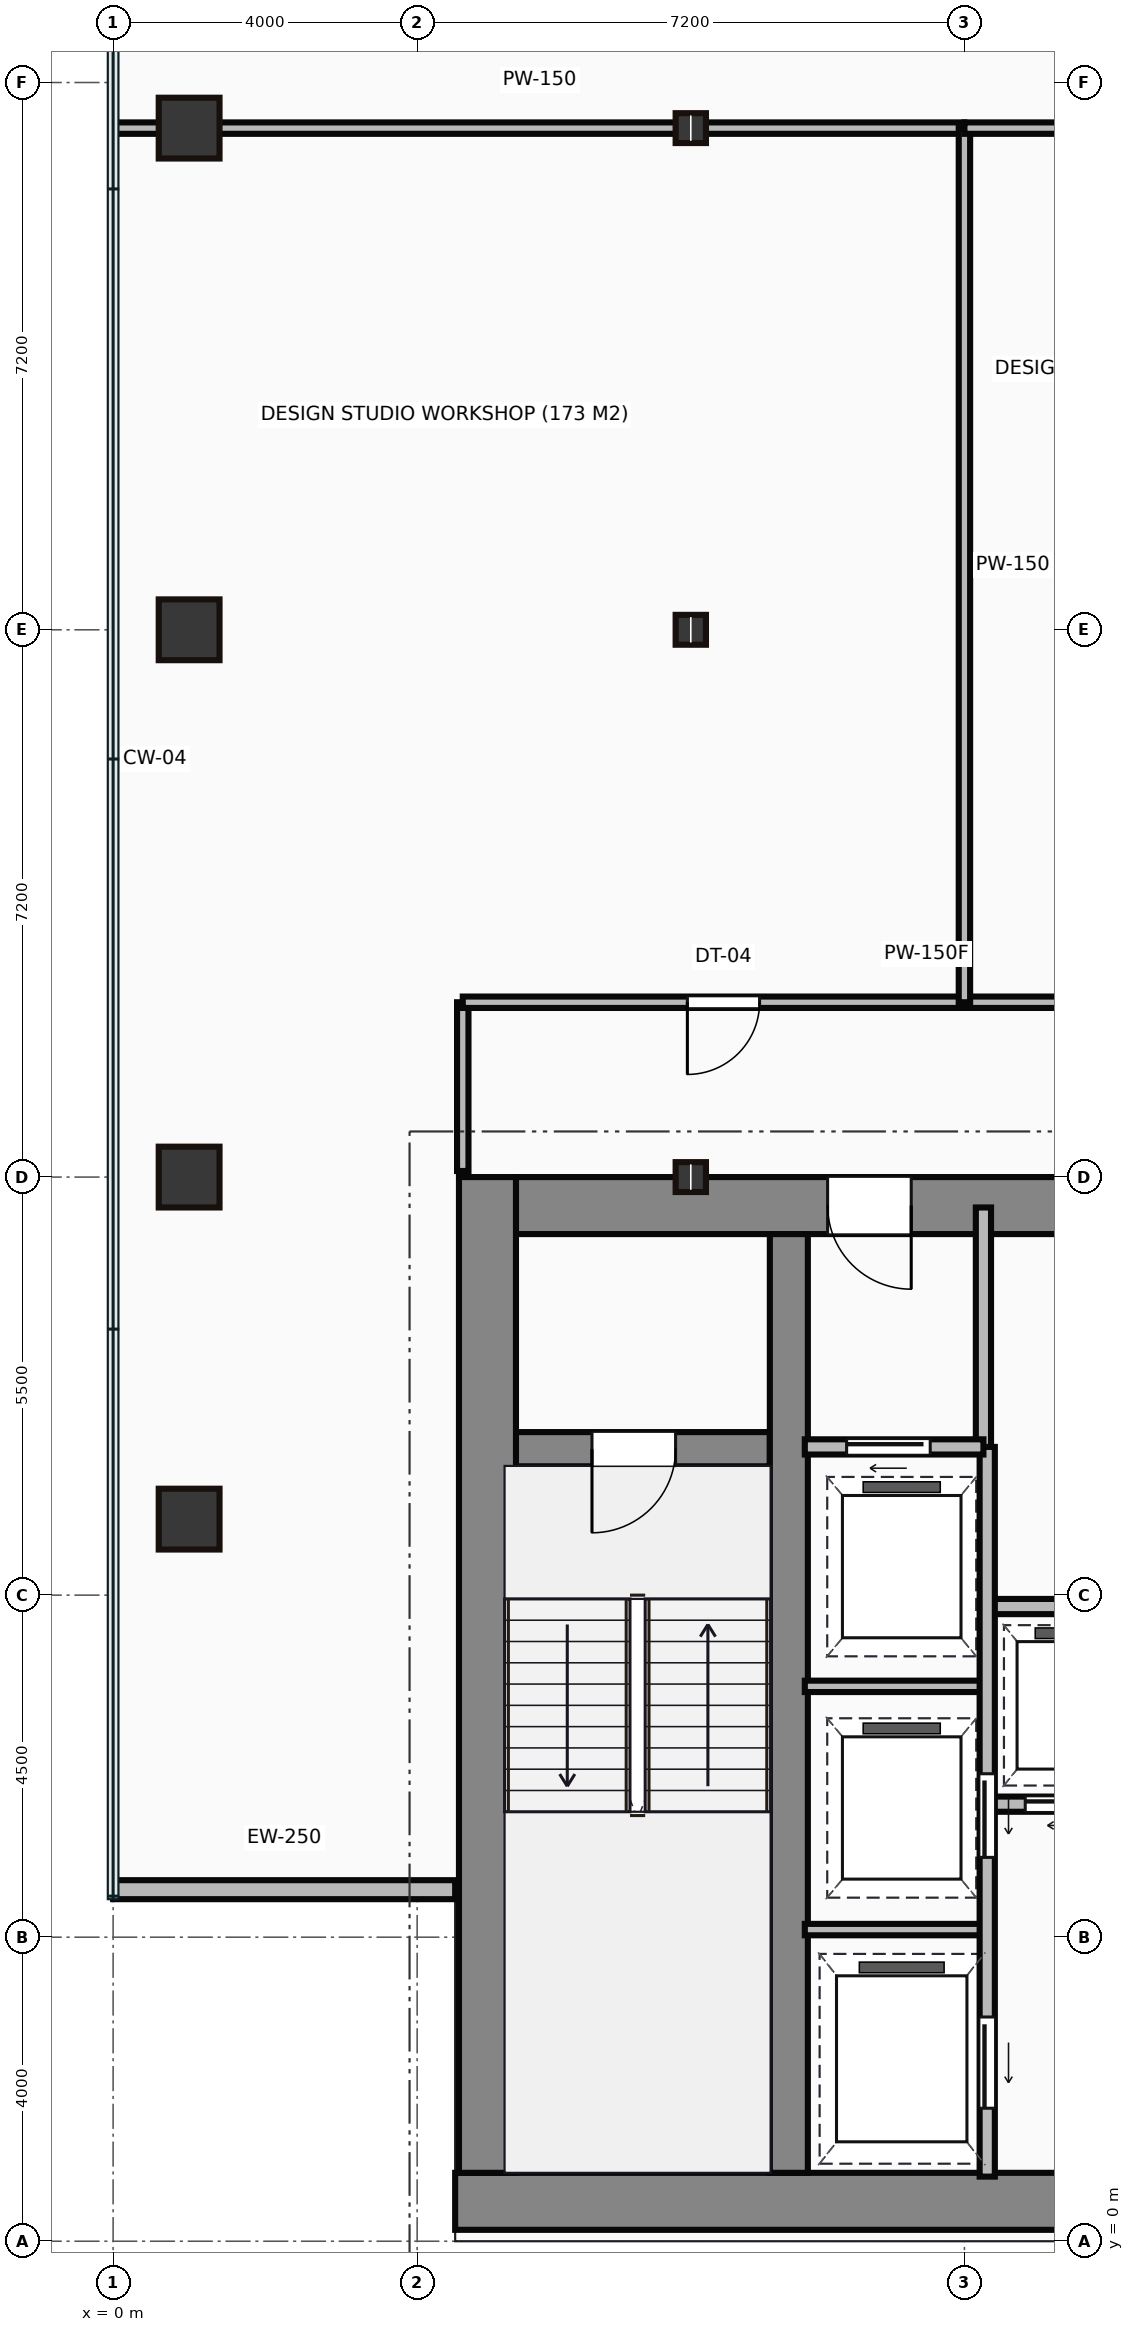
"""IFC4 building model, lengths in metres.
Left out: names, types, materials, properties, quantities, classifications, styles, units other than length and angle.
Written with IfcOpenShell. Run it as: python <this file> out.ifc"""

import sys

from ifc_helpers import new_model, si_unit, direction, frame, frame_2d, origin, origin_2d, place, context, subcontext, project, spatial, rectangle, hollow_rectangle, i_section, extrude, source, transform, mapped, element, fill, save


model = new_model("IFC4")
c1 = context("Model", 3, precision=1e-05, world=origin(), true_north=direction((0.0, 1.0)))
c2 = subcontext(c1, "Body", "Model", "MODEL_VIEW")
j1 = project(units=[si_unit("LENGTHUNIT", "METRE"), si_unit("PLANEANGLEUNIT", "RADIAN")], contexts=[c1])
p1 = place(None, origin())
s1 = spatial("IfcSite", under=j1, at=p1, CompositionType="ELEMENT")
p2 = place(p1, origin())
s2 = spatial("IfcBuilding", under=s1, at=p2, CompositionType="ELEMENT")
p3 = place(p2, frame((0.0, 0.0, 92.3)))
s3 = spatial("IfcBuildingStorey", under=s2, at=p3, CompositionType="ELEMENT", Elevation=92.3)
m1 = source(origin(), c2, "Body", "SweptSolid", [
    extrude(rectangle(XDim=29.5, YDim=0.75, at=frame_2d((14.75, 0.0))), origin(), (0.0, 0.0, 1.0), 3.65),
])
p4 = place(p3, frame((4.5, 0.525, 0.0), z_axis=(0.0, 0.0, 1.0), x_axis=(1.0, 0.0, 0.0)))
e1 = element("IfcWall", 1, at=p4, inside=s3, PredefinedType="SHEAR", context=c2, shape_type="MappedRepresentation", body=[
    mapped(m1, transform((0.0, 0.0, 0.0))),
])
m2 = source(origin(), c2, "Body", "SweptSolid", [
    extrude(rectangle(XDim=13.1, YDim=0.75, at=frame_2d((6.55, 0.0))), origin(), (0.0, 0.0, 1.0), 3.65),
])
p5 = place(p3, frame((4.925, 0.9, 0.0), z_axis=(0.0, 0.0, 1.0), x_axis=(0.0, 1.0, 0.0)))
e2 = element("IfcWall", 2, at=p5, inside=s3, PredefinedType="SHEAR", context=c2, shape_type="MappedRepresentation", body=[
    mapped(m2, transform((0.0, 0.0, 0.0))),
])
m3 = source(origin(), c2, "Body", "SweptSolid", [
    extrude(rectangle(XDim=9.1, YDim=0.75, at=frame_2d((4.55, 0.0))), origin(), (0.0, 0.0, 1.0), 3.65),
])
p6 = place(p3, frame((5.3, 13.625, 0.0), z_axis=(0.0, 0.0, 1.0), x_axis=(1.0, 0.0, 0.0)))
e3 = element("IfcWall", 3, at=p6, inside=s3, PredefinedType="SHEAR", context=c2, shape_type="MappedRepresentation", body=[
    mapped(m3, transform((0.0, 0.0, 0.0))),
])
p7 = place(p6, frame((4.1, 0.0, 0.0)))
e4 = element("IfcOpeningElement", 4, at=p7, cuts=e3, PredefinedType="OPENING", context=c2, shape_type="SweptSolid", body=[
    extrude(rectangle(XDim=1.1, YDim=2.15, at=frame_2d((0.55, 1.075))), frame((0.0, 0.385, 0.0), z_axis=(0.0, -1.0, 0.0), x_axis=(1.0, 0.0, 0.0)), (0.0, 0.0, 1.0), 0.77),
])
m4 = source(origin(), c2, "Body", "SweptSolid", [
    extrude(rectangle(XDim=12.35, YDim=0.5, at=frame_2d((6.175, 0.0))), origin(), (0.0, 0.0, 1.0), 3.65),
])
p8 = place(p3, frame((8.89, 0.9, 0.0), z_axis=(0.0, 0.0, 1.0), x_axis=(0.0, 1.0, 0.0)))
e5 = element("IfcWall", 5, at=p8, inside=s3, PredefinedType="SHEAR", context=c2, shape_type="MappedRepresentation", body=[
    mapped(m4, transform((0.0, 0.0, 0.0))),
])
m5 = source(origin(), c2, "Body", "SweptSolid", [
    extrude(rectangle(XDim=3.39, YDim=0.45, at=frame_2d((1.695, 0.0))), origin(), (0.0, 0.0, 1.0), 3.65),
])
p9 = place(p3, frame((5.25, 10.42, 0.0), z_axis=(0.0, 0.0, 1.0), x_axis=(1.0, 0.0, 0.0)))
e6 = element("IfcWall", 6, at=p9, inside=s3, PredefinedType="SHEAR", context=c2, shape_type="MappedRepresentation", body=[
    mapped(m5, transform((0.0, 0.0, 0.0))),
])
p10 = place(p9, frame((1.05, 0.0, 0.0)))
e7 = element("IfcOpeningElement", 7, at=p10, cuts=e6, PredefinedType="OPENING", context=c2, shape_type="SweptSolid", body=[
    extrude(rectangle(XDim=1.1, YDim=2.15, at=frame_2d((0.55, 1.075))), frame((0.0, 0.235, 0.0), z_axis=(0.0, -1.0, 0.0), x_axis=(1.0, 0.0, 0.0)), (0.0, 0.0, 1.0), 0.47),
])
m6 = source(origin(), c2, "Body", "SweptSolid", [
    extrude(hollow_rectangle(XDim=0.8, YDim=0.8, WallThickness=0.04, at=origin_2d()), origin(), (0.0, 0.0, 1.0), 3.65),
])
for number, where, z_axis, x_axis in (
    (8, (1.0, 9.5, 0.0), (0.0, 0.0, 1.0), (1.0, 0.0, 0.0)),
    (9, (1.0, 14.0, 0.0), (0.0, 0.0, 1.0), (1.0, 0.0, 0.0)),
    (10, (1.0, 21.2, 0.0), (0.0, 0.0, 1.0), (1.0, 0.0, 0.0)),
    (11, (1.0, 27.8, 0.0), (0.0, 0.0, 1.0), (1.0, 0.0, 0.0)),
):
    element("IfcColumn", number, at=place(p3, frame(where, z_axis=z_axis, x_axis=x_axis)), inside=s3, PredefinedType="COLUMN", context=c2, shape_type="MappedRepresentation", body=[
        mapped(m6, transform((0.0, 0.0, 0.0))),
    ])
m7 = source(origin(), c2, "Body", "SweptSolid", [
    extrude(i_section(OverallWidth=0.399, OverallDepth=0.393, WebThickness=0.023, FlangeThickness=0.037, at=origin_2d()), origin(), (0.0, 0.0, 1.0), 3.65),
])
for number, where, z_axis, x_axis in (
    (12, (7.6, 14.0, 0.0), (0.0, 0.0, 1.0), (1.0, 0.0, 0.0)),
    (13, (7.6, 21.2, 0.0), (0.0, 0.0, 1.0), (1.0, 0.0, 0.0)),
    (14, (7.6, 27.8, 0.0), (0.0, 0.0, 1.0), (1.0, 0.0, 0.0)),
):
    element("IfcColumn", number, at=place(p3, frame(where, z_axis=z_axis, x_axis=x_axis)), inside=s3, PredefinedType="COLUMN", context=c2, shape_type="MappedRepresentation", body=[
        mapped(m7, transform((0.0, 0.0, 0.0))),
    ])
m8 = source(origin(), c2, "Body", "SweptSolid", [
    extrude(rectangle(XDim=4.5, YDim=0.25, at=frame_2d((2.25, 0.0))), origin(), (0.0, 0.0, 1.0), 3.4),
])
p11 = place(p3, frame((0.0, 4.625, 0.0), z_axis=(0.0, 0.0, 1.0), x_axis=(1.0, 0.0, 0.0)))
e15 = element("IfcWall", 15, at=p11, inside=s3, PredefinedType="STANDARD", context=c2, shape_type="MappedRepresentation", body=[
    mapped(m8, transform((0.0, 0.0, 0.0))),
])
m9 = source(origin(), c2, "Body", "SweptSolid", [
    extrude(rectangle(XDim=3.18, YDim=0.2, at=frame_2d((1.59, 0.0))), origin(), (0.0, 0.0, 1.0), 3.4),
])
p12 = place(p3, frame((11.45, 10.42, 0.0), z_axis=(0.0, 0.0, 1.0), x_axis=(0.0, 1.0, 0.0)))
e16 = element("IfcWall", 16, at=p12, inside=s3, PredefinedType="PARTITIONING", context=c2, shape_type="MappedRepresentation", body=[
    mapped(m9, transform((0.0, 0.0, 0.0))),
])
m10 = source(origin(), c2, "Body", "SweptSolid", [
    extrude(rectangle(XDim=2.35, YDim=0.2, at=frame_2d((1.175, 0.0))), origin(), (0.0, 0.0, 1.0), 3.4),
])
p13 = place(p3, frame((9.1, 10.45, 0.0), z_axis=(0.0, 0.0, 1.0), x_axis=(1.0, 0.0, 0.0)))
e17 = element("IfcWall", 17, at=p13, inside=s3, PredefinedType="PARTITIONING", context=c2, shape_type="MappedRepresentation", body=[
    mapped(m10, transform((0.0, 0.0, 0.0))),
])
p14 = place(p13, frame((0.55, 0.0, 0.0)))
e18 = element("IfcOpeningElement", 18, at=p14, cuts=e17, PredefinedType="OPENING", context=c2, shape_type="SweptSolid", body=[
    extrude(rectangle(XDim=1.1, YDim=2.15, at=frame_2d((0.55, 1.075))), frame((0.0, 0.11, 0.0), z_axis=(0.0, -1.0, 0.0), x_axis=(1.0, 0.0, 0.0)), (0.0, 0.0, 1.0), 0.22),
])
m11 = source(origin(), c2, "Body", "SweptSolid", [
    extrude(rectangle(XDim=9.6, YDim=0.2, at=frame_2d((4.8, 0.0))), origin(), (0.0, 0.0, 1.0), 3.4),
])
p15 = place(p3, frame((11.5, 0.85, 0.0), z_axis=(0.0, 0.0, 1.0), x_axis=(0.0, 1.0, 0.0)))
e19 = element("IfcWall", 19, at=p15, inside=s3, PredefinedType="PARTITIONING", context=c2, shape_type="MappedRepresentation", body=[
    mapped(m11, transform((0.0, 0.0, 0.0))),
])
p16 = place(p15, frame((4.2, 0.0, 0.0)))
e20 = element("IfcOpeningElement", 20, at=p16, cuts=e19, PredefinedType="OPENING", context=c2, shape_type="SweptSolid", body=[
    extrude(rectangle(XDim=1.1, YDim=2.15, at=frame_2d((0.55, 1.075))), frame((0.0, 0.11, 0.0), z_axis=(0.0, -1.0, 0.0), x_axis=(1.0, 0.0, 0.0)), (0.0, 0.0, 1.0), 0.22),
])
p17 = place(p15, frame((0.9, 0.0, 0.0)))
e21 = element("IfcOpeningElement", 21, at=p17, cuts=e19, PredefinedType="OPENING", context=c2, shape_type="SweptSolid", body=[
    extrude(rectangle(XDim=1.2, YDim=2.15, at=frame_2d((0.6, 1.075))), frame((0.0, 0.11, 0.0), z_axis=(0.0, -1.0, 0.0), x_axis=(1.0, 0.0, 0.0)), (0.0, 0.0, 1.0), 0.22),
])
m12 = source(origin(), c2, "Body", "SweptSolid", [
    extrude(rectangle(XDim=2.4, YDim=0.15, at=frame_2d((1.2, 0.0))), origin(), (0.0, 0.0, 1.0), 3.4),
])
for number, where, z_axis, x_axis in (
    (22, (9.1, 4.1, 0.0), (0.0, 0.0, 1.0), (1.0, 0.0, 0.0)),
    (23, (9.1, 7.3, 0.0), (0.0, 0.0, 1.0), (1.0, 0.0, 0.0)),
):
    element("IfcWall", number, at=place(p3, frame(where, z_axis=z_axis, x_axis=x_axis)), inside=s3, PredefinedType="PARTITIONING", context=c2, shape_type="MappedRepresentation", body=[
        mapped(m12, transform((0.0, 0.0, 0.0))),
    ])
m13 = source(origin(), c2, "Body", "SweptSolid", [
    extrude(rectangle(XDim=11.85, YDim=0.2, at=frame_2d((5.925, 0.0))), origin(), (0.0, 0.0, 1.0), 3.4),
])
p18 = place(p3, frame((11.55, 5.75, 0.0), z_axis=(0.0, 0.0, 1.0), x_axis=(1.0, 0.0, 0.0)))
e24 = element("IfcWall", 24, at=p18, inside=s3, PredefinedType="PARTITIONING", context=c2, shape_type="MappedRepresentation", body=[
    mapped(m13, transform((0.0, 0.0, 0.0))),
])
p19 = place(p18, frame((0.45, 0.0, 0.0)))
e25 = element("IfcOpeningElement", 25, at=p19, cuts=e24, PredefinedType="OPENING", context=c2, shape_type="SweptSolid", body=[
    extrude(rectangle(XDim=1.05, YDim=2.15, at=frame_2d((0.525, 1.075))), frame((0.0, 0.11, 0.0), z_axis=(0.0, -1.0, 0.0), x_axis=(1.0, 0.0, 0.0)), (0.0, 0.0, 1.0), 0.22),
])
p20 = place(p18, frame((2.4, 0.0, 0.0)))
e26 = element("IfcOpeningElement", 26, at=p20, cuts=e24, PredefinedType="OPENING", context=c2, shape_type="SweptSolid", body=[
    extrude(rectangle(XDim=1.05, YDim=2.15, at=frame_2d((0.525, 1.075))), frame((0.0, 0.11, 0.0), z_axis=(0.0, -1.0, 0.0), x_axis=(1.0, 0.0, 0.0)), (0.0, 0.0, 1.0), 0.22),
])
p21 = place(p18, frame((4.35, 0.0, 0.0)))
e27 = element("IfcOpeningElement", 27, at=p21, cuts=e24, PredefinedType="OPENING", context=c2, shape_type="SweptSolid", body=[
    extrude(rectangle(XDim=1.05, YDim=2.15, at=frame_2d((0.525, 1.075))), frame((0.0, 0.11, 0.0), z_axis=(0.0, -1.0, 0.0), x_axis=(1.0, 0.0, 0.0)), (0.0, 0.0, 1.0), 0.22),
])
p22 = place(p18, frame((6.3, 0.0, 0.0)))
e28 = element("IfcOpeningElement", 28, at=p22, cuts=e24, PredefinedType="OPENING", context=c2, shape_type="SweptSolid", body=[
    extrude(rectangle(XDim=1.05, YDim=2.15, at=frame_2d((0.525, 1.075))), frame((0.0, 0.11, 0.0), z_axis=(0.0, -1.0, 0.0), x_axis=(1.0, 0.0, 0.0)), (0.0, 0.0, 1.0), 0.22),
])
p23 = place(p18, frame((8.25, 0.0, 0.0)))
e29 = element("IfcOpeningElement", 29, at=p23, cuts=e24, PredefinedType="OPENING", context=c2, shape_type="SweptSolid", body=[
    extrude(rectangle(XDim=1.05, YDim=2.15, at=frame_2d((0.525, 1.075))), frame((0.0, 0.11, 0.0), z_axis=(0.0, -1.0, 0.0), x_axis=(1.0, 0.0, 0.0)), (0.0, 0.0, 1.0), 0.22),
])
p24 = place(p18, frame((10.2, 0.0, 0.0)))
e30 = element("IfcOpeningElement", 30, at=p24, cuts=e24, PredefinedType="OPENING", context=c2, shape_type="SweptSolid", body=[
    extrude(rectangle(XDim=1.05, YDim=2.15, at=frame_2d((0.525, 1.075))), frame((0.0, 0.11, 0.0), z_axis=(0.0, -1.0, 0.0), x_axis=(1.0, 0.0, 0.0)), (0.0, 0.0, 1.0), 0.22),
])
p25 = place(p3, frame((11.55, 8.35, 0.0), z_axis=(0.0, 0.0, 1.0), x_axis=(1.0, 0.0, 0.0)))
e31 = element("IfcWall", 31, at=p25, inside=s3, PredefinedType="PARTITIONING", context=c2, shape_type="MappedRepresentation", body=[
    mapped(m13, transform((0.0, 0.0, 0.0))),
])
m14 = source(origin(), c2, "Body", "SweptSolid", [
    extrude(rectangle(XDim=2.22, YDim=0.15, at=frame_2d((1.11, 0.0))), origin(), (0.0, 0.0, 1.0), 3.4),
])
p26 = place(p3, frame((4.6, 14.08, 0.0), z_axis=(0.0, 0.0, 1.0), x_axis=(0.0, 1.0, 0.0)))
e32 = element("IfcWall", 32, at=p26, inside=s3, PredefinedType="PARTITIONING", context=c2, shape_type="MappedRepresentation", body=[
    mapped(m14, transform((0.0, 0.0, 0.0))),
])
m15 = source(origin(), c2, "Body", "SweptSolid", [
    extrude(rectangle(XDim=12.2, YDim=0.15, at=frame_2d((6.1, 0.0))), origin(), (0.0, 0.0, 1.0), 3.4),
])
p27 = place(p3, frame((4.6, 16.3, 0.0), z_axis=(0.0, 0.0, 1.0), x_axis=(1.0, 0.0, 0.0)))
e33 = element("IfcWall", 33, at=p27, inside=s3, PredefinedType="PARTITIONING", context=c2, shape_type="MappedRepresentation", body=[
    mapped(m15, transform((0.0, 0.0, 0.0))),
])
p28 = place(p27, frame((2.955, 0.0, 0.0)))
e34 = element("IfcOpeningElement", 34, at=p28, cuts=e33, PredefinedType="OPENING", context=c2, shape_type="SweptSolid", body=[
    extrude(rectangle(XDim=0.95, YDim=2.15, at=frame_2d((0.475, 1.075))), frame((0.0, 0.085, 0.0), z_axis=(0.0, -1.0, 0.0), x_axis=(1.0, 0.0, 0.0)), (0.0, 0.0, 1.0), 0.17),
])
m16 = source(origin(), c2, "Body", "SweptSolid", [
    extrude(rectangle(XDim=11.18, YDim=0.15, at=frame_2d((5.59, 0.0))), origin(), (0.0, 0.0, 1.0), 2.702),
])
p29 = place(p3, frame((0.02, 27.8, 0.0), z_axis=(0.0, 0.0, 1.0), x_axis=(1.0, 0.0, 0.0)))
e35 = element("IfcWall", 35, at=p29, inside=s3, PredefinedType="PARTITIONING", context=c2, shape_type="MappedRepresentation", body=[
    mapped(m16, transform((0.0, 0.0, 0.0))),
])
m17 = source(origin(), c2, "Body", "SweptSolid", [
    extrude(rectangle(XDim=11.5, YDim=0.15, at=frame_2d((5.75, 0.0))), origin(), (0.0, 0.0, 1.0), 3.4),
])
p30 = place(p3, frame((11.2, 27.8, 0.0), z_axis=(0.0, 0.0, 1.0), x_axis=(0.0, -1.0, 0.0)))
e36 = element("IfcWall", 36, at=p30, inside=s3, PredefinedType="PARTITIONING", context=c2, shape_type="MappedRepresentation", body=[
    mapped(m17, transform((0.0, 0.0, 0.0))),
])
m18 = source(origin(), c2, "Body", "SweptSolid", [
    extrude(rectangle(XDim=5.6, YDim=0.15, at=frame_2d((2.8, 0.0))), origin(), (0.0, 0.0, 1.0), 2.702),
])
p31 = place(p3, frame((16.8, 27.8, 0.0), z_axis=(0.0, 0.0, 1.0), x_axis=(-1.0, 0.0, 0.0)))
e37 = element("IfcWall", 37, at=p31, inside=s3, PredefinedType="PARTITIONING", context=c2, shape_type="MappedRepresentation", body=[
    mapped(m18, transform((0.0, 0.0, 0.0))),
])
m19 = source(origin(), c2, "Body", "SweptSolid", [
    extrude(rectangle(XDim=1.1, YDim=2.15, at=frame_2d((0.55, 1.075))), frame((0.0, 0.025, 0.0), z_axis=(0.0, -1.0, 0.0), x_axis=(1.0, 0.0, 0.0)), (0.0, 0.0, 1.0), 0.05),
])
p32 = place(p10, frame((1.1, 0.0, 0.0), z_axis=(0.0, 0.0, 1.0), x_axis=(-1.0, 0.0, 0.0)))
e38 = element("IfcDoor", 38, at=p32, inside=s3, OperationType="SINGLE_SWING_LEFT", PredefinedType="DOOR", context=c2, shape_type="MappedRepresentation", body=[
    mapped(m19, transform((0.0, 0.0, 0.0))),
])
fill(e7, e38)
p33 = place(p7, origin())
e39 = element("IfcDoor", 39, at=p33, inside=s3, OperationType="SINGLE_SWING_RIGHT", PredefinedType="DOOR", context=c2, shape_type="MappedRepresentation", body=[
    mapped(m19, transform((0.0, 0.0, 0.0))),
])
fill(e4, e39)
p34 = place(p14, origin())
e40 = element("IfcDoor", 40, at=p34, inside=s3, OperationType="SLIDING_TO_LEFT", PredefinedType="DOOR", context=c2, shape_type="MappedRepresentation", body=[
    mapped(m19, transform((0.0, 0.0, 0.0))),
])
fill(e18, e40)
p35 = place(p16, frame((1.1, 0.0, 0.0), z_axis=(0.0, 0.0, 1.0), x_axis=(-1.0, 0.0, 0.0)))
e41 = element("IfcDoor", 41, at=p35, inside=s3, OperationType="SLIDING_TO_LEFT", PredefinedType="DOOR", context=c2, shape_type="MappedRepresentation", body=[
    mapped(m19, transform((0.0, 0.0, 0.0))),
])
fill(e20, e41)
m20 = source(origin(), c2, "Body", "SweptSolid", [
    extrude(rectangle(XDim=1.2, YDim=2.15, at=frame_2d((0.6, 1.075))), frame((0.0, 0.025, 0.0), z_axis=(0.0, -1.0, 0.0), x_axis=(1.0, 0.0, 0.0)), (0.0, 0.0, 1.0), 0.05),
])
p36 = place(p17, frame((1.2, 0.0, 0.0), z_axis=(0.0, 0.0, 1.0), x_axis=(-1.0, 0.0, 0.0)))
e42 = element("IfcDoor", 42, at=p36, inside=s3, OperationType="SLIDING_TO_LEFT", PredefinedType="DOOR", context=c2, shape_type="MappedRepresentation", body=[
    mapped(m20, transform((0.0, 0.0, 0.0))),
])
fill(e21, e42)
m21 = source(origin(), c2, "Body", "SweptSolid", [
    extrude(rectangle(XDim=1.05, YDim=2.15, at=frame_2d((0.525, 1.075))), frame((0.0, 0.025, 0.0), z_axis=(0.0, -1.0, 0.0), x_axis=(1.0, 0.0, 0.0)), (0.0, 0.0, 1.0), 0.05),
])
p37 = place(p19, frame((1.05, 0.0, 0.0), z_axis=(0.0, 0.0, 1.0), x_axis=(-1.0, 0.0, 0.0)))
e43 = element("IfcDoor", 43, at=p37, inside=s3, OperationType="SLIDING_TO_LEFT", PredefinedType="DOOR", context=c2, shape_type="MappedRepresentation", body=[
    mapped(m21, transform((0.0, 0.0, 0.0))),
])
fill(e25, e43)
m22 = source(origin(), c2, "Body", "SweptSolid", [
    extrude(rectangle(XDim=0.95, YDim=2.15, at=frame_2d((0.475, 1.075))), frame((0.0, 0.025, 0.0), z_axis=(0.0, -1.0, 0.0), x_axis=(1.0, 0.0, 0.0)), (0.0, 0.0, 1.0), 0.05),
])
p38 = place(p28, origin())
e44 = element("IfcDoor", 44, at=p38, inside=s3, OperationType="SINGLE_SWING_LEFT", PredefinedType="DOOR", context=c2, shape_type="MappedRepresentation", body=[
    mapped(m22, transform((0.0, 0.0, 0.0))),
])
fill(e34, e44)
save(model, sys.argv[1])
